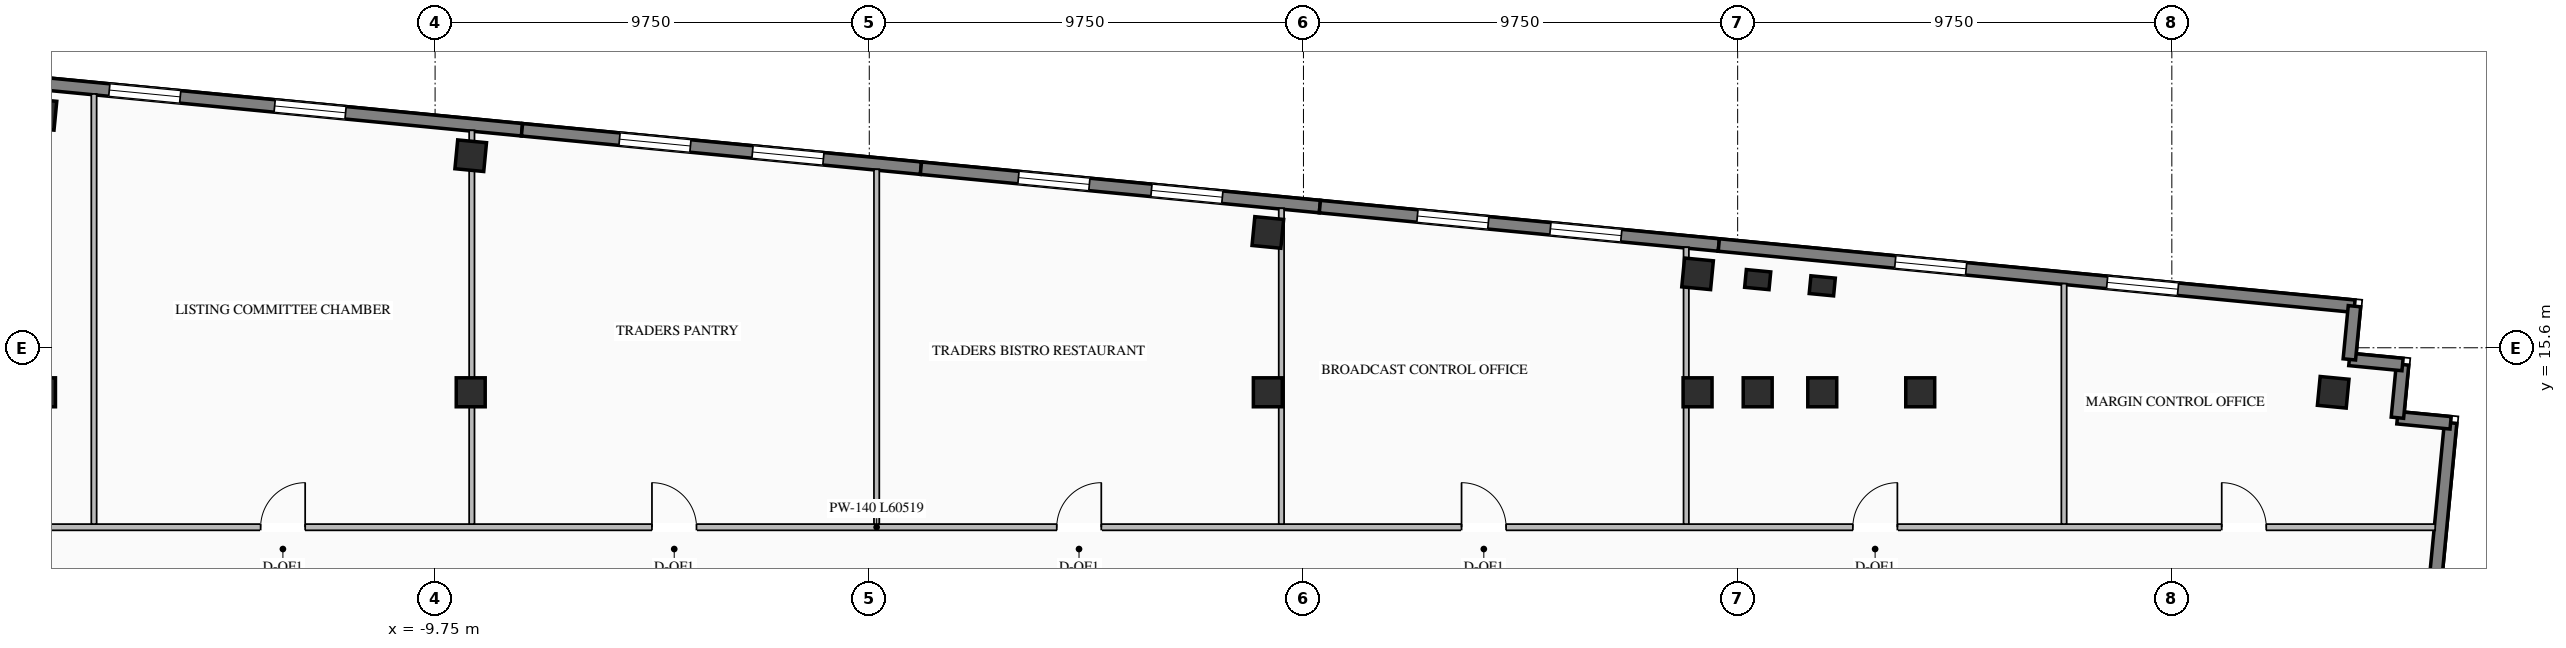
"""IFC4 building model, lengths in metres.
Left out: names, types, materials, properties, quantities, classifications, styles, units other than length and angle.
Written with IfcOpenShell. Run it as: python <this file> out.ifc"""

import sys

from ifc_helpers import new_model, si_unit, direction, frame, frame_2d, origin, origin_2d, place, context, subcontext, project, spatial, rectangle, i_section, extrude, element, fill, save


model = new_model("IFC4")
c1 = context("Model", 3, precision=1e-05, world=origin(), true_north=direction((0.0, 1.0)))
c2 = subcontext(c1, "Body", "Model", "MODEL_VIEW")
j1 = project(units=[si_unit("LENGTHUNIT", "METRE"), si_unit("PLANEANGLEUNIT", "RADIAN")], contexts=[c1])
p1 = place(None, origin())
s1 = spatial("IfcSite", under=j1, at=p1, CompositionType="ELEMENT")
p2 = place(p1, origin())
s2 = spatial("IfcBuilding", under=s1, at=p2, CompositionType="ELEMENT")
p3 = place(p2, frame((0.0, 0.0, 188.0)))
s3 = spatial("IfcBuildingStorey", under=s2, at=p3, CompositionType="ELEMENT", Elevation=188.0)
for number, where, z_axis, x_axis in (
    (1, (-18.6, 14.6, 0.0), (0.0, 0.0, 1.0), (1.0, 0.0, 0.0)),
    (2, (-8.95, 14.6, 0.0), (0.0, 0.0, 1.0), (1.0, 0.0, 0.0)),
    (3, (8.95, 14.6, 0.0), (0.0, 0.0, 1.0), (1.0, 0.0, 0.0)),
    (4, (18.6, 14.6, 0.0), (0.0, 0.0, 1.0), (1.0, 0.0, 0.0)),
    (5, (19.95, 14.6, 0.0), (0.0, 0.0, 1.0), (1.0, 0.0, 0.0)),
    (6, (21.4, 14.6, 0.0), (0.0, 0.0, 1.0), (1.0, 0.0, 0.0)),
    (7, (23.6, 14.6, 0.0), (0.0, 0.0, 1.0), (1.0, 0.0, 0.0)),
    (8, (-18.6, 20.842, 0.0), (0.0, 0.0, 1.0), (0.995, -0.096, 0.0)),
    (9, (-8.95, 19.913, 0.0), (0.0, 0.0, 1.0), (0.995, -0.096, 0.0)),
    (10, (8.95, 18.19, 0.0), (0.0, 0.0, 1.0), (0.995, -0.096, 0.0)),
    (11, (18.6, 17.26, 0.0), (0.0, 0.0, 1.0), (0.995, -0.096, 0.0)),
    (12, (32.874, 14.6, 0.0), (0.0, 0.0, 1.0), (0.995, -0.096, 0.0)),
):
    element("IfcColumn", number, at=place(p3, frame(where, z_axis=z_axis, x_axis=x_axis)), inside=s3, PredefinedType="COLUMN", context=c2, shape_type="SweptSolid", body=[
        extrude(i_section(OverallWidth=0.65, OverallDepth=0.65, WebThickness=0.028, FlangeThickness=0.04, at=origin_2d()), origin(), (0.0, 0.0, 1.0), 3.45),
    ])
for number, where, z_axis, x_axis in (
    (13, (19.95, 17.131, 0.0), (0.0, 0.0, 1.0), (0.995, -0.096, 0.0)),
    (14, (21.4, 16.991, 0.0), (0.0, 0.0, 1.0), (0.995, -0.096, 0.0)),
):
    element("IfcColumn", number, at=place(p3, frame(where, z_axis=z_axis, x_axis=x_axis)), inside=s3, PredefinedType="PILASTER", context=c2, shape_type="SweptSolid", body=[
        extrude(rectangle(XDim=0.55, YDim=0.4, at=origin_2d()), origin(), (0.0, 0.0, 1.0), 3.45),
    ])
p4 = place(p3, frame((-22.073, 21.87, 0.0), z_axis=(0.0, 0.0, 1.0), x_axis=(0.995395606285, -0.095851901334, 0.0)))
e15 = element("IfcWall", 15, at=p4, inside=s3, PredefinedType="STANDARD", context=c2, shape_type="SweptSolid", body=[
    extrude(rectangle(XDim=14.34, YDim=0.28, at=frame_2d((7.17, 0.0))), origin(), (0.0, 0.0, 1.0), 3.25),
])
p5 = place(p4, frame((5.03, 0.0, 0.76)))
e16 = element("IfcOpeningElement", 16, at=p5, cuts=e15, PredefinedType="OPENING", context=c2, shape_type="SweptSolid", body=[
    extrude(rectangle(XDim=1.6, YDim=1.95, at=frame_2d((0.8, 0.975))), frame((0.0, 0.15, 0.0), z_axis=(0.0, -1.0, 0.0), x_axis=(1.0, 0.0, 0.0)), (0.0, 0.0, 1.0), 0.3),
])
p6 = place(p4, frame((8.76, 0.0, 0.76)))
e17 = element("IfcOpeningElement", 17, at=p6, cuts=e15, PredefinedType="OPENING", context=c2, shape_type="SweptSolid", body=[
    extrude(rectangle(XDim=1.6, YDim=1.95, at=frame_2d((0.8, 0.975))), frame((0.0, 0.15, 0.0), z_axis=(0.0, -1.0, 0.0), x_axis=(1.0, 0.0, 0.0)), (0.0, 0.0, 1.0), 0.3),
])
p7 = place(p3, frame((-7.799, 20.496, 0.0), z_axis=(0.0, 0.0, 1.0), x_axis=(0.995396794462, -0.09583956164, 0.0)))
e18 = element("IfcWall", 18, at=p7, inside=s3, PredefinedType="STANDARD", context=c2, shape_type="SweptSolid", body=[
    extrude(rectangle(XDim=9.0, YDim=0.28, at=frame_2d((4.5, 0.0))), origin(), (0.0, 0.0, 1.0), 3.25),
])
p8 = place(p7, frame((2.2, 0.0, 0.76)))
e19 = element("IfcOpeningElement", 19, at=p8, cuts=e18, PredefinedType="OPENING", context=c2, shape_type="SweptSolid", body=[
    extrude(rectangle(XDim=1.6, YDim=1.95, at=frame_2d((0.8, 0.975))), frame((0.0, 0.15, 0.0), z_axis=(0.0, -1.0, 0.0), x_axis=(1.0, 0.0, 0.0)), (0.0, 0.0, 1.0), 0.3),
])
p9 = place(p7, frame((5.2, 0.0, 0.76)))
e20 = element("IfcOpeningElement", 20, at=p9, cuts=e18, PredefinedType="OPENING", context=c2, shape_type="SweptSolid", body=[
    extrude(rectangle(XDim=1.6, YDim=1.95, at=frame_2d((0.8, 0.975))), frame((0.0, 0.15, 0.0), z_axis=(0.0, -1.0, 0.0), x_axis=(1.0, 0.0, 0.0)), (0.0, 0.0, 1.0), 0.3),
])
p10 = place(p3, frame((1.16, 19.633, 0.0), z_axis=(0.0, 0.0, 1.0), x_axis=(0.995394455533, -0.09586385082, 0.0)))
e21 = element("IfcWall", 21, at=p10, inside=s3, PredefinedType="STANDARD", context=c2, shape_type="SweptSolid", body=[
    extrude(rectangle(XDim=9.0, YDim=0.28, at=frame_2d((4.5, 0.0))), origin(), (0.0, 0.0, 1.0), 3.25),
])
p11 = place(p10, frame((2.2, 0.0, 0.76)))
e22 = element("IfcOpeningElement", 22, at=p11, cuts=e21, PredefinedType="OPENING", context=c2, shape_type="SweptSolid", body=[
    extrude(rectangle(XDim=1.6, YDim=1.95, at=frame_2d((0.8, 0.975))), frame((0.0, 0.15, 0.0), z_axis=(0.0, -1.0, 0.0), x_axis=(1.0, 0.0, 0.0)), (0.0, 0.0, 1.0), 0.3),
])
p12 = place(p10, frame((5.2, 0.0, 0.76)))
e23 = element("IfcOpeningElement", 23, at=p12, cuts=e21, PredefinedType="OPENING", context=c2, shape_type="SweptSolid", body=[
    extrude(rectangle(XDim=1.6, YDim=1.95, at=frame_2d((0.8, 0.975))), frame((0.0, 0.15, 0.0), z_axis=(0.0, -1.0, 0.0), x_axis=(1.0, 0.0, 0.0)), (0.0, 0.0, 1.0), 0.3),
])
p13 = place(p3, frame((10.119, 18.77, 0.0), z_axis=(0.0, 0.0, 1.0), x_axis=(0.995396794462, -0.09583956164, 0.0)))
e24 = element("IfcWall", 24, at=p13, inside=s3, PredefinedType="STANDARD", context=c2, shape_type="SweptSolid", body=[
    extrude(rectangle(XDim=9.0, YDim=0.28, at=frame_2d((4.5, 0.0))), origin(), (0.0, 0.0, 1.0), 3.25),
])
p14 = place(p13, frame((2.2, 0.0, 0.76)))
e25 = element("IfcOpeningElement", 25, at=p14, cuts=e24, PredefinedType="OPENING", context=c2, shape_type="SweptSolid", body=[
    extrude(rectangle(XDim=1.6, YDim=1.95, at=frame_2d((0.8, 0.975))), frame((0.0, 0.15, 0.0), z_axis=(0.0, -1.0, 0.0), x_axis=(1.0, 0.0, 0.0)), (0.0, 0.0, 1.0), 0.3),
])
p15 = place(p13, frame((5.2, 0.0, 0.76)))
e26 = element("IfcOpeningElement", 26, at=p15, cuts=e24, PredefinedType="OPENING", context=c2, shape_type="SweptSolid", body=[
    extrude(rectangle(XDim=1.6, YDim=1.95, at=frame_2d((0.8, 0.975))), frame((0.0, 0.15, 0.0), z_axis=(0.0, -1.0, 0.0), x_axis=(1.0, 0.0, 0.0)), (0.0, 0.0, 1.0), 0.3),
])
p16 = place(p3, frame((19.077, 17.908, 0.0), z_axis=(0.0, 0.0, 1.0), x_axis=(0.995395606285, -0.095851901334, 0.0)))
e27 = element("IfcWall", 27, at=p16, inside=s3, PredefinedType="STANDARD", context=c2, shape_type="SweptSolid", body=[
    extrude(rectangle(XDim=14.34, YDim=0.28, at=frame_2d((7.17, 0.0))), origin(), (0.0, 0.0, 1.0), 3.25),
])
p17 = place(p16, frame((3.98, 0.0, 0.76)))
e28 = element("IfcOpeningElement", 28, at=p17, cuts=e27, PredefinedType="OPENING", context=c2, shape_type="SweptSolid", body=[
    extrude(rectangle(XDim=1.6, YDim=1.95, at=frame_2d((0.8, 0.975))), frame((0.0, 0.15, 0.0), z_axis=(0.0, -1.0, 0.0), x_axis=(1.0, 0.0, 0.0)), (0.0, 0.0, 1.0), 0.3),
])
p18 = place(p16, frame((8.76, 0.0, 0.76)))
e29 = element("IfcOpeningElement", 29, at=p18, cuts=e27, PredefinedType="OPENING", context=c2, shape_type="SweptSolid", body=[
    extrude(rectangle(XDim=1.6, YDim=1.95, at=frame_2d((0.8, 0.975))), frame((0.0, 0.15, 0.0), z_axis=(0.0, -1.0, 0.0), x_axis=(1.0, 0.0, 0.0)), (0.0, 0.0, 1.0), 0.3),
])
p19 = place(p3, frame((35.51, 13.914, 0.0), z_axis=(0.0, 0.0, 1.0), x_axis=(-0.095839027265, -0.995396845913, 0.0)))
e30 = element("IfcWall", 30, at=p19, inside=s3, PredefinedType="STANDARD", context=c2, shape_type="SweptSolid", body=[
    extrude(rectangle(XDim=16.79, YDim=0.28, at=frame_2d((8.395, 0.0))), origin(), (0.0, 0.0, 1.0), 3.25),
])
p20 = place(p19, frame((5.647, 0.0, 0.76)))
e31 = element("IfcOpeningElement", 31, at=p20, cuts=e30, PredefinedType="OPENING", context=c2, shape_type="SweptSolid", body=[
    extrude(rectangle(XDim=2.0, YDim=2.05, at=frame_2d((1.0, 1.025))), frame((0.0, 0.15, 0.0), z_axis=(0.0, -1.0, 0.0), x_axis=(1.0, 0.0, 0.0)), (0.0, 0.0, 1.0), 0.3),
])
p21 = place(p19, frame((10.193, 0.0, 0.76)))
e32 = element("IfcOpeningElement", 32, at=p21, cuts=e30, PredefinedType="OPENING", context=c2, shape_type="SweptSolid", body=[
    extrude(rectangle(XDim=2.0, YDim=2.05, at=frame_2d((1.0, 1.025))), frame((0.0, 0.15, 0.0), z_axis=(0.0, -1.0, 0.0), x_axis=(1.0, 0.0, 0.0)), (0.0, 0.0, 1.0), 0.3),
])
p22 = place(p3, frame((35.51, 13.914, 0.0), z_axis=(0.0, 0.0, 1.0), x_axis=(-0.995397091755, 0.095836473879, 0.0)))
e33 = element("IfcWall", 33, at=p22, inside=s3, PredefinedType="STANDARD", context=c2, shape_type="SweptSolid", body=[
    extrude(rectangle(XDim=1.2, YDim=0.28, at=frame_2d((0.6, 0.0))), origin(), (0.0, 0.0, 1.0), 3.25),
])
for number, where, z_axis, x_axis in (
    (34, (34.316, 14.029, 0.0), (0.0, 0.0, 1.0), (0.096, 0.995, 0.0)),
    (35, (34.431, 15.224, 0.0), (0.0, 0.0, 1.0), (-0.995, 0.096, 0.0)),
):
    element("IfcWall", number, at=place(p3, frame(where, z_axis=z_axis, x_axis=x_axis)), inside=s3, PredefinedType="STANDARD", context=c2, shape_type="SweptSolid", body=[
        extrude(rectangle(XDim=1.2, YDim=0.28, at=frame_2d((0.6, 0.0))), origin(), (0.0, 0.0, 1.0), 3.25),
    ])
p23 = place(p3, frame((33.236, 15.339, 0.0), z_axis=(0.0, 0.0, 1.0), x_axis=(0.095836473879, 0.995397091755, 0.0)))
e36 = element("IfcWall", 36, at=p23, inside=s3, PredefinedType="STANDARD", context=c2, shape_type="SweptSolid", body=[
    extrude(rectangle(XDim=1.2, YDim=0.28, at=frame_2d((0.6, 0.0))), origin(), (0.0, 0.0, 1.0), 3.25),
])
p24 = place(p3, frame((-25.355, 11.57, 0.0), z_axis=(0.0, 0.0, 1.0), x_axis=(1.0, 0.0, 0.0)))
e37 = element("IfcWall", 37, at=p24, inside=s3, PredefinedType="STANDARD", context=c2, shape_type="SweptSolid", body=[
    extrude(rectangle(XDim=60.519, YDim=0.14, at=frame_2d((30.259, 0.0))), origin(), (0.0, 0.0, 1.0), 2.795),
])
p25 = place(p24, frame((3.598, 0.0, 0.0)))
e38 = element("IfcOpeningElement", 38, at=p25, cuts=e37, PredefinedType="OPENING", context=c2, shape_type="SweptSolid", body=[
    extrude(rectangle(XDim=1.0, YDim=2.08, at=frame_2d((0.5, 1.04))), frame((0.0, 0.08, 0.0), z_axis=(0.0, -1.0, 0.0), x_axis=(1.0, 0.0, 0.0)), (0.0, 0.0, 1.0), 0.16),
])
p26 = place(p24, frame((11.688, 0.0, 0.0)))
e39 = element("IfcOpeningElement", 39, at=p26, cuts=e37, PredefinedType="OPENING", context=c2, shape_type="SweptSolid", body=[
    extrude(rectangle(XDim=1.0, YDim=2.08, at=frame_2d((0.5, 1.04))), frame((0.0, 0.08, 0.0), z_axis=(0.0, -1.0, 0.0), x_axis=(1.0, 0.0, 0.0)), (0.0, 0.0, 1.0), 0.16),
])
p27 = place(p24, frame((20.475, 0.0, 0.0)))
e40 = element("IfcOpeningElement", 40, at=p27, cuts=e37, PredefinedType="OPENING", context=c2, shape_type="SweptSolid", body=[
    extrude(rectangle(XDim=1.0, YDim=2.08, at=frame_2d((0.5, 1.04))), frame((0.0, 0.08, 0.0), z_axis=(0.0, -1.0, 0.0), x_axis=(1.0, 0.0, 0.0)), (0.0, 0.0, 1.0), 0.16),
])
p28 = place(p24, frame((29.565, 0.0, 0.0)))
e41 = element("IfcOpeningElement", 41, at=p28, cuts=e37, PredefinedType="OPENING", context=c2, shape_type="SweptSolid", body=[
    extrude(rectangle(XDim=1.0, YDim=2.08, at=frame_2d((0.5, 1.04))), frame((0.0, 0.08, 0.0), z_axis=(0.0, -1.0, 0.0), x_axis=(1.0, 0.0, 0.0)), (0.0, 0.0, 1.0), 0.16),
])
p29 = place(p24, frame((38.655, 0.0, 0.0)))
e42 = element("IfcOpeningElement", 42, at=p29, cuts=e37, PredefinedType="OPENING", context=c2, shape_type="SweptSolid", body=[
    extrude(rectangle(XDim=1.0, YDim=2.08, at=frame_2d((0.5, 1.04))), frame((0.0, 0.08, 0.0), z_axis=(0.0, -1.0, 0.0), x_axis=(1.0, 0.0, 0.0)), (0.0, 0.0, 1.0), 0.16),
])
p30 = place(p24, frame((47.442, 0.0, 0.0)))
e43 = element("IfcOpeningElement", 43, at=p30, cuts=e37, PredefinedType="OPENING", context=c2, shape_type="SweptSolid", body=[
    extrude(rectangle(XDim=1.0, YDim=2.08, at=frame_2d((0.5, 1.04))), frame((0.0, 0.08, 0.0), z_axis=(0.0, -1.0, 0.0), x_axis=(1.0, 0.0, 0.0)), (0.0, 0.0, 1.0), 0.16),
])
p31 = place(p24, frame((55.725, 0.0, 0.0)))
e44 = element("IfcOpeningElement", 44, at=p31, cuts=e37, PredefinedType="OPENING", context=c2, shape_type="SweptSolid", body=[
    extrude(rectangle(XDim=1.0, YDim=2.08, at=frame_2d((0.5, 1.04))), frame((0.0, 0.08, 0.0), z_axis=(0.0, -1.0, 0.0), x_axis=(1.0, 0.0, 0.0)), (0.0, 0.0, 1.0), 0.16),
])
p32 = place(p3, frame((-17.41, 11.64, 0.0), z_axis=(0.0, 0.0, 1.0), x_axis=(0.0, 1.0, 0.0)))
e45 = element("IfcWall", 45, at=p32, inside=s3, PredefinedType="STANDARD", context=c2, shape_type="SweptSolid", body=[
    extrude(rectangle(XDim=9.661, YDim=0.12, at=frame_2d((4.83, 0.0))), origin(), (0.0, 0.0, 1.0), 3.25),
])
p33 = place(p3, frame((-8.925, 11.64, 0.0), z_axis=(0.0, 0.0, 1.0), x_axis=(0.0, 1.0, 0.0)))
e46 = element("IfcWall", 46, at=p33, inside=s3, PredefinedType="STANDARD", context=c2, shape_type="SweptSolid", body=[
    extrude(rectangle(XDim=8.844, YDim=0.12, at=frame_2d((4.422, 0.0))), origin(), (0.0, 0.0, 1.0), 2.645),
])
p34 = place(p3, frame((0.165, 11.64, 0.0), z_axis=(0.0, 0.0, 1.0), x_axis=(0.0, 1.0, 0.0)))
e47 = element("IfcWall", 47, at=p34, inside=s3, PredefinedType="STANDARD", context=c2, shape_type="SweptSolid", body=[
    extrude(rectangle(XDim=7.968, YDim=0.12, at=frame_2d((3.984, 0.0))), origin(), (0.0, 0.0, 1.0), 3.25),
])
p35 = place(p3, frame((9.255, 11.64, 0.0), z_axis=(0.0, 0.0, 1.0), x_axis=(0.0, 1.0, 0.0)))
e48 = element("IfcWall", 48, at=p35, inside=s3, PredefinedType="STANDARD", context=c2, shape_type="SweptSolid", body=[
    extrude(rectangle(XDim=7.093, YDim=0.12, at=frame_2d((3.546, 0.0))), origin(), (0.0, 0.0, 1.0), 3.25),
])
p36 = place(p3, frame((18.345, 11.64, 0.0), z_axis=(0.0, 0.0, 1.0), x_axis=(0.0, 1.0, 0.0)))
e49 = element("IfcWall", 49, at=p36, inside=s3, PredefinedType="STANDARD", context=c2, shape_type="SweptSolid", body=[
    extrude(rectangle(XDim=6.218, YDim=0.12, at=frame_2d((3.109, 0.0))), origin(), (0.0, 0.0, 1.0), 3.25),
])
p37 = place(p3, frame((26.829, 11.64, 0.0), z_axis=(0.0, 0.0, 1.0), x_axis=(0.0, 1.0, 0.0)))
e50 = element("IfcWall", 50, at=p37, inside=s3, PredefinedType="STANDARD", context=c2, shape_type="SweptSolid", body=[
    extrude(rectangle(XDim=5.401, YDim=0.12, at=frame_2d((2.7, 0.0))), origin(), (0.0, 0.0, 1.0), 3.25),
])
p38 = place(p5, origin())
e51 = element("IfcWindow", 51, at=p38, inside=s3, PartitioningType="SINGLE_PANEL", PredefinedType="WINDOW", context=c2, shape_type="SweptSolid", body=[
    extrude(rectangle(XDim=1.6, YDim=1.95, at=frame_2d((0.8, 0.975))), frame((0.0, 0.03, 0.0), z_axis=(0.0, -1.0, 0.0), x_axis=(1.0, 0.0, 0.0)), (0.0, 0.0, 1.0), 0.06),
])
fill(e16, e51)
p39 = place(p6, origin())
e52 = element("IfcWindow", 52, at=p39, inside=s3, PartitioningType="SINGLE_PANEL", PredefinedType="WINDOW", context=c2, shape_type="SweptSolid", body=[
    extrude(rectangle(XDim=1.6, YDim=1.95, at=frame_2d((0.8, 0.975))), frame((0.0, 0.03, 0.0), z_axis=(0.0, -1.0, 0.0), x_axis=(1.0, 0.0, 0.0)), (0.0, 0.0, 1.0), 0.06),
])
fill(e17, e52)
p40 = place(p8, origin())
e53 = element("IfcWindow", 53, at=p40, inside=s3, PartitioningType="SINGLE_PANEL", PredefinedType="WINDOW", context=c2, shape_type="SweptSolid", body=[
    extrude(rectangle(XDim=1.6, YDim=1.95, at=frame_2d((0.8, 0.975))), frame((0.0, 0.03, 0.0), z_axis=(0.0, -1.0, 0.0), x_axis=(1.0, 0.0, 0.0)), (0.0, 0.0, 1.0), 0.06),
])
fill(e19, e53)
p41 = place(p9, origin())
e54 = element("IfcWindow", 54, at=p41, inside=s3, PartitioningType="SINGLE_PANEL", PredefinedType="WINDOW", context=c2, shape_type="SweptSolid", body=[
    extrude(rectangle(XDim=1.6, YDim=1.95, at=frame_2d((0.8, 0.975))), frame((0.0, 0.03, 0.0), z_axis=(0.0, -1.0, 0.0), x_axis=(1.0, 0.0, 0.0)), (0.0, 0.0, 1.0), 0.06),
])
fill(e20, e54)
p42 = place(p11, origin())
e55 = element("IfcWindow", 55, at=p42, inside=s3, PartitioningType="SINGLE_PANEL", PredefinedType="WINDOW", context=c2, shape_type="SweptSolid", body=[
    extrude(rectangle(XDim=1.6, YDim=1.95, at=frame_2d((0.8, 0.975))), frame((0.0, 0.03, 0.0), z_axis=(0.0, -1.0, 0.0), x_axis=(1.0, 0.0, 0.0)), (0.0, 0.0, 1.0), 0.06),
])
fill(e22, e55)
p43 = place(p12, origin())
e56 = element("IfcWindow", 56, at=p43, inside=s3, PartitioningType="SINGLE_PANEL", PredefinedType="WINDOW", context=c2, shape_type="SweptSolid", body=[
    extrude(rectangle(XDim=1.6, YDim=1.95, at=frame_2d((0.8, 0.975))), frame((0.0, 0.03, 0.0), z_axis=(0.0, -1.0, 0.0), x_axis=(1.0, 0.0, 0.0)), (0.0, 0.0, 1.0), 0.06),
])
fill(e23, e56)
p44 = place(p14, origin())
e57 = element("IfcWindow", 57, at=p44, inside=s3, PartitioningType="SINGLE_PANEL", PredefinedType="WINDOW", context=c2, shape_type="SweptSolid", body=[
    extrude(rectangle(XDim=1.6, YDim=1.95, at=frame_2d((0.8, 0.975))), frame((0.0, 0.03, 0.0), z_axis=(0.0, -1.0, 0.0), x_axis=(1.0, 0.0, 0.0)), (0.0, 0.0, 1.0), 0.06),
])
fill(e25, e57)
p45 = place(p15, origin())
e58 = element("IfcWindow", 58, at=p45, inside=s3, PartitioningType="SINGLE_PANEL", PredefinedType="WINDOW", context=c2, shape_type="SweptSolid", body=[
    extrude(rectangle(XDim=1.6, YDim=1.95, at=frame_2d((0.8, 0.975))), frame((0.0, 0.03, 0.0), z_axis=(0.0, -1.0, 0.0), x_axis=(1.0, 0.0, 0.0)), (0.0, 0.0, 1.0), 0.06),
])
fill(e26, e58)
p46 = place(p17, origin())
e59 = element("IfcWindow", 59, at=p46, inside=s3, PartitioningType="SINGLE_PANEL", PredefinedType="WINDOW", context=c2, shape_type="SweptSolid", body=[
    extrude(rectangle(XDim=1.6, YDim=1.95, at=frame_2d((0.8, 0.975))), frame((0.0, 0.03, 0.0), z_axis=(0.0, -1.0, 0.0), x_axis=(1.0, 0.0, 0.0)), (0.0, 0.0, 1.0), 0.06),
])
fill(e28, e59)
p47 = place(p18, origin())
e60 = element("IfcWindow", 60, at=p47, inside=s3, PartitioningType="SINGLE_PANEL", PredefinedType="WINDOW", context=c2, shape_type="SweptSolid", body=[
    extrude(rectangle(XDim=1.6, YDim=1.95, at=frame_2d((0.8, 0.975))), frame((0.0, 0.03, 0.0), z_axis=(0.0, -1.0, 0.0), x_axis=(1.0, 0.0, 0.0)), (0.0, 0.0, 1.0), 0.06),
])
fill(e29, e60)
p48 = place(p26, origin())
e61 = element("IfcDoor", 61, at=p48, inside=s3, OperationType="SINGLE_SWING_RIGHT", PredefinedType="DOOR", context=c2, shape_type="SweptSolid", body=[
    extrude(rectangle(XDim=1.0, YDim=2.08, at=frame_2d((0.5, 1.04))), frame((0.0, 0.025, 0.0), z_axis=(0.0, -1.0, 0.0), x_axis=(1.0, 0.0, 0.0)), (0.0, 0.0, 1.0), 0.05),
])
fill(e39, e61)
p49 = place(p27, origin())
e62 = element("IfcDoor", 62, at=p49, inside=s3, OperationType="SINGLE_SWING_LEFT", PredefinedType="DOOR", context=c2, shape_type="SweptSolid", body=[
    extrude(rectangle(XDim=1.0, YDim=2.08, at=frame_2d((0.5, 1.04))), frame((0.0, 0.025, 0.0), z_axis=(0.0, -1.0, 0.0), x_axis=(1.0, 0.0, 0.0)), (0.0, 0.0, 1.0), 0.05),
])
fill(e40, e62)
p50 = place(p28, origin())
e63 = element("IfcDoor", 63, at=p50, inside=s3, OperationType="SINGLE_SWING_RIGHT", PredefinedType="DOOR", context=c2, shape_type="SweptSolid", body=[
    extrude(rectangle(XDim=1.0, YDim=2.08, at=frame_2d((0.5, 1.04))), frame((0.0, 0.025, 0.0), z_axis=(0.0, -1.0, 0.0), x_axis=(1.0, 0.0, 0.0)), (0.0, 0.0, 1.0), 0.05),
])
fill(e41, e63)
p51 = place(p29, origin())
e64 = element("IfcDoor", 64, at=p51, inside=s3, OperationType="SINGLE_SWING_LEFT", PredefinedType="DOOR", context=c2, shape_type="SweptSolid", body=[
    extrude(rectangle(XDim=1.0, YDim=2.08, at=frame_2d((0.5, 1.04))), frame((0.0, 0.025, 0.0), z_axis=(0.0, -1.0, 0.0), x_axis=(1.0, 0.0, 0.0)), (0.0, 0.0, 1.0), 0.05),
])
fill(e42, e64)
p52 = place(p30, origin())
e65 = element("IfcDoor", 65, at=p52, inside=s3, OperationType="SINGLE_SWING_RIGHT", PredefinedType="DOOR", context=c2, shape_type="SweptSolid", body=[
    extrude(rectangle(XDim=1.0, YDim=2.08, at=frame_2d((0.5, 1.04))), frame((0.0, 0.025, 0.0), z_axis=(0.0, -1.0, 0.0), x_axis=(1.0, 0.0, 0.0)), (0.0, 0.0, 1.0), 0.05),
])
fill(e43, e65)
p53 = place(p31, origin())
e66 = element("IfcDoor", 66, at=p53, inside=s3, OperationType="SINGLE_SWING_LEFT", PredefinedType="DOOR", context=c2, shape_type="SweptSolid", body=[
    extrude(rectangle(XDim=1.0, YDim=2.08, at=frame_2d((0.5, 1.04))), frame((0.0, 0.025, 0.0), z_axis=(0.0, -1.0, 0.0), x_axis=(1.0, 0.0, 0.0)), (0.0, 0.0, 1.0), 0.05),
])
fill(e44, e66)
save(model, sys.argv[1])
